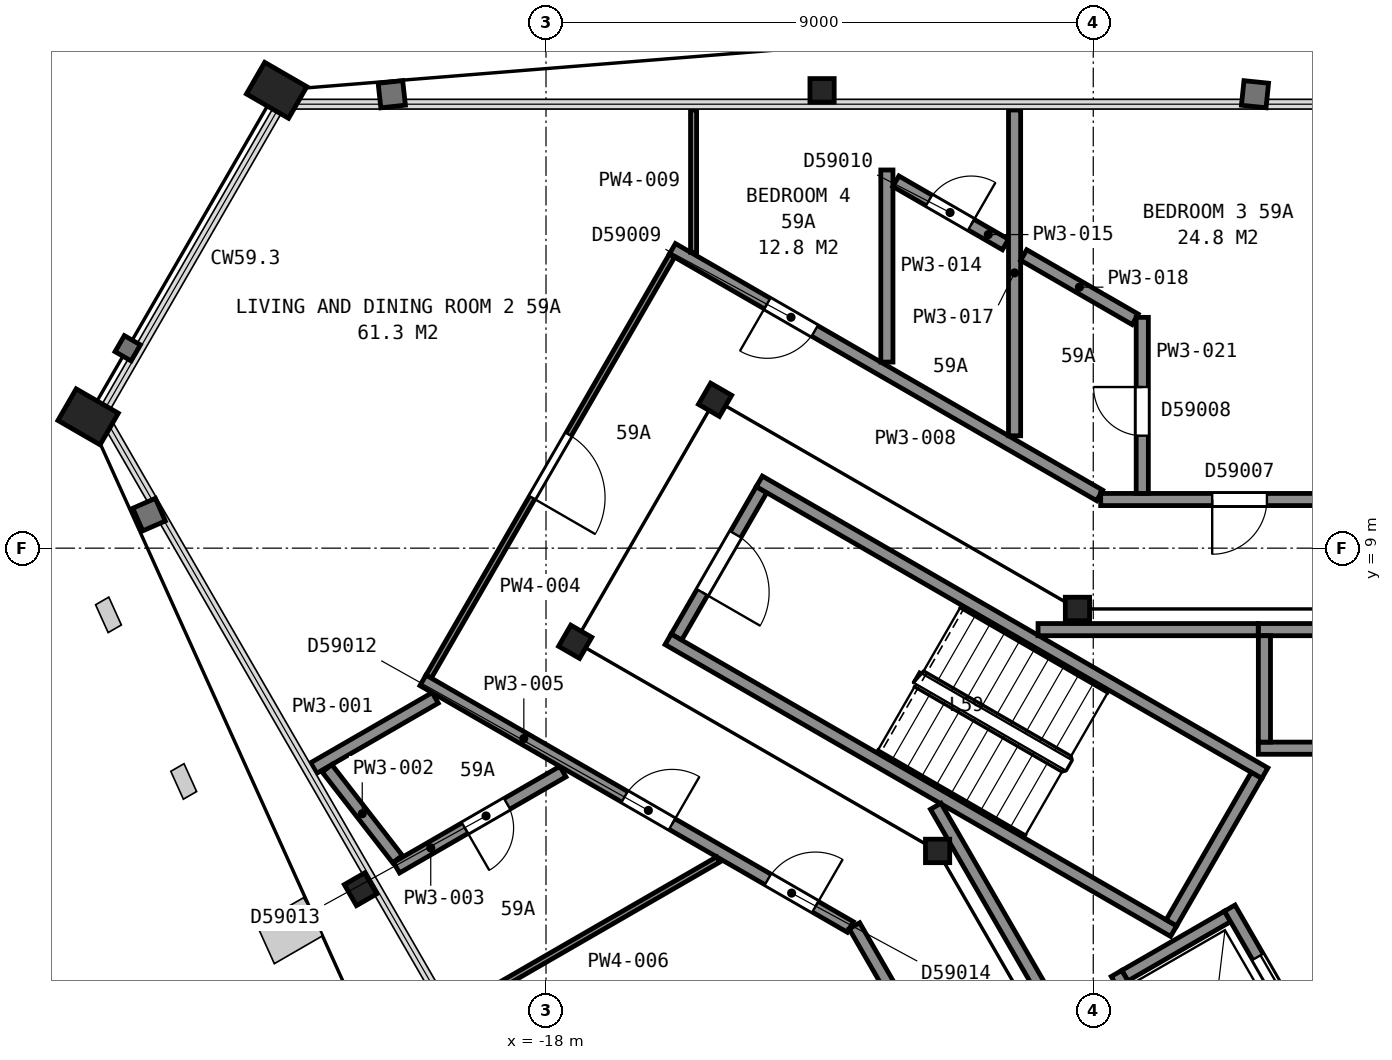
"""IFC4 building model, lengths in metres.
Left out: names, types, materials, properties, quantities, classifications, styles, units other than length and angle.
Written with IfcOpenShell. Run it as: python <this file> out.ifc"""

import sys

from ifc_helpers import new_model, si_unit, direction, frame, frame_2d, origin, origin_2d, place, context, subcontext, project, spatial, rectangle, hollow_rectangle, i_section, extrude, element, fill, save


model = new_model("IFC4")
c1 = context("Model", 3, precision=1e-05, world=origin(), true_north=direction((0.0, 1.0)))
c2 = subcontext(c1, "Body", "Model", "MODEL_VIEW")
j1 = project(units=[si_unit("LENGTHUNIT", "METRE"), si_unit("PLANEANGLEUNIT", "RADIAN")], contexts=[c1])
p1 = place(None, origin())
s1 = spatial("IfcSite", under=j1, at=p1, CompositionType="ELEMENT")
p2 = place(p1, origin())
s2 = spatial("IfcBuilding", under=s1, at=p2, CompositionType="ELEMENT")
p3 = place(p2, frame((0.0, 0.0, 236.0)))
s3 = spatial("IfcBuildingStorey", under=s2, at=p3, CompositionType="ELEMENT", Elevation=236.0)
p4 = place(p3, frame((-13.46, 16.53, 0.035), z_axis=(0.0, 0.0, 1.0), x_axis=(1.0, 0.0, 0.0)))
e1 = element("IfcColumn", 1, at=p4, inside=s3, PredefinedType="COLUMN", context=c2, shape_type="SweptSolid", body=[
    extrude(i_section(OverallWidth=0.399, OverallDepth=0.386, WebThickness=0.021, FlangeThickness=0.033, FilletRadius=0.015, at=origin_2d()), origin(), (0.0, 0.0, 1.0), 3.665),
])
for number, where, z_axis, x_axis in (
    (2, (-22.43, 16.53, 0.065), (0.0, 0.0, 1.0), (0.5, 0.866, 0.0)),
    (3, (-25.53, 11.16, 0.065), (0.0, 0.0, 1.0), (0.5, 0.866, 0.0)),
):
    element("IfcColumn", number, at=place(p3, frame(where, z_axis=z_axis, x_axis=x_axis)), inside=s3, PredefinedType="COLUMN", context=c2, shape_type="SweptSolid", body=[
        extrude(hollow_rectangle(XDim=0.6, YDim=0.8, WallThickness=0.05, at=origin_2d()), origin(), (0.0, 0.0, 1.0), 3.635),
    ])
p5 = place(p3, frame((-21.05, 3.39, 0.04), z_axis=(0.0, 0.0, 1.0), x_axis=(-0.5, 0.866025403784, 0.0)))
e4 = element("IfcColumn", 4, at=p5, inside=s3, PredefinedType="COLUMN", context=c2, shape_type="SweptSolid", body=[
    extrude(i_section(OverallWidth=0.399, OverallDepth=0.386, WebThickness=0.021, FlangeThickness=0.033, FilletRadius=0.015, at=origin_2d()), origin(), (0.0, 0.0, 1.0), 3.66),
])
p6 = place(p3, frame((-9.26, 8.0, 0.0), z_axis=(0.0, 0.0, 1.0), x_axis=(1.0, 0.0, 0.0)))
e5 = element("IfcColumn", 5, at=p6, inside=s3, PredefinedType="COLUMN", context=c2, shape_type="SweptSolid", body=[
    extrude(i_section(OverallWidth=0.399, OverallDepth=0.386, WebThickness=0.021, FlangeThickness=0.033, FilletRadius=0.015, at=origin_2d()), origin(), (0.0, 0.0, 1.0), 3.7),
])
for number, where, z_axis, x_axis in (
    (6, (-15.22, 11.44, 0.0), (0.0, 0.0, 1.0), (0.5, 0.866, 0.0)),
    (7, (-17.52, 7.46, 0.0), (0.0, 0.0, 1.0), (0.5, 0.866, 0.0)),
):
    element("IfcColumn", number, at=place(p3, frame(where, z_axis=z_axis, x_axis=x_axis)), inside=s3, PredefinedType="COLUMN", context=c2, shape_type="SweptSolid", body=[
        extrude(i_section(OverallWidth=0.401, OverallDepth=0.399, WebThickness=0.025, FlangeThickness=0.04, FilletRadius=0.015, at=origin_2d()), origin(), (0.0, 0.0, 1.0), 3.7),
    ])
p7 = place(p3, frame((-11.56, 4.02, 0.0), z_axis=(0.0, 0.0, 1.0), x_axis=(1.0, 0.0, 0.0)))
e8 = element("IfcColumn", 8, at=p7, inside=s3, PredefinedType="COLUMN", context=c2, shape_type="SweptSolid", body=[
    extrude(i_section(OverallWidth=0.399, OverallDepth=0.386, WebThickness=0.021, FlangeThickness=0.033, FilletRadius=0.015, at=origin_2d()), origin(), (0.0, 0.0, 1.0), 3.7),
])
p8 = place(p3, frame((-14.455, 9.962, 0.0), z_axis=(0.0, 0.0, 1.0), x_axis=(-0.500049511043, -0.865996816683, 0.0)))
e9 = element("IfcWall", 9, at=p8, inside=s3, PredefinedType="PARTITIONING", context=c2, shape_type="SweptSolid", body=[
    extrude(rectangle(XDim=2.8, YDim=0.2, at=frame_2d((1.4, 0.0))), origin(), (0.0, 0.0, 1.0), 3.45),
])
p9 = place(p8, frame((0.85, 0.0, 0.0)))
e10 = element("IfcOpeningElement", 10, at=p9, cuts=e9, PredefinedType="OPENING", context=c2, shape_type="SweptSolid", body=[
    extrude(rectangle(XDim=1.1, YDim=2.1, at=frame_2d((0.55, 1.05))), frame((0.0, 0.11, 0.0), z_axis=(0.0, -1.0, 0.0), x_axis=(1.0, 0.0, 0.0)), (0.0, 0.0, 1.0), 0.22),
])
for number, where, z_axis, x_axis in (
    (11, (-7.678, 2.701, 0.0), (0.0, 0.0, 1.0), (-0.866, 0.5, 0.0)),
    (12, (-6.178, 5.299, 0.0), (0.0, 0.0, 1.0), (-0.866, 0.5, 0.0)),
):
    element("IfcWall", number, at=place(p3, frame(where, z_axis=z_axis, x_axis=x_axis)), inside=s3, PredefinedType="PARTITIONING", context=c2, shape_type="SweptSolid", body=[
        extrude(rectangle(XDim=9.6, YDim=0.2, at=frame_2d((4.8, 0.0))), origin(), (0.0, 0.0, 1.0), 3.45),
    ])
p10 = place(p3, frame((-6.315, 5.262, 0.0), z_axis=(0.0, 0.0, 1.0), x_axis=(-0.500049511043, -0.865996816683, 0.0)))
e13 = element("IfcWall", 13, at=p10, inside=s3, PredefinedType="PARTITIONING", context=c2, shape_type="SweptSolid", body=[
    extrude(rectangle(XDim=2.8, YDim=0.2, at=frame_2d((1.4, 0.0))), origin(), (0.0, 0.0, 1.0), 3.45),
])
for number, where, z_axis, x_axis in (
    (14, (-6.285, 5.71, 0.0), (0.0, 0.0, 1.0), (1.0, 0.0, 0.0)),
    (15, (-6.285, 7.66, 0.0), (0.0, 0.0, 1.0), (1.0, 0.0, 0.0)),
):
    element("IfcWall", number, at=place(p3, frame(where, z_axis=z_axis, x_axis=x_axis)), inside=s3, PredefinedType="PARTITIONING", context=c2, shape_type="SweptSolid", body=[
        extrude(rectangle(XDim=2.35, YDim=0.2, at=frame_2d((1.175, 0.0))), origin(), (0.0, 0.0, 1.0), 3.7),
    ])
p11 = place(p3, frame((-8.48, 1.969, 0.0), z_axis=(0.0, 0.0, 1.0), x_axis=(0.866000020948, 0.500043961785, 0.0)))
e16 = element("IfcWall", 16, at=p11, inside=s3, PredefinedType="PARTITIONING", context=c2, shape_type="SweptSolid", body=[
    extrude(rectangle(XDim=1.95, YDim=0.2, at=frame_2d((0.975, 0.0))), origin(), (0.0, 0.0, 1.0), 3.7),
])
p12 = place(p3, frame((-6.185, 5.81, 0.0), z_axis=(0.0, 0.0, 1.0), x_axis=(0.0, 1.0, 0.0)))
e17 = element("IfcWall", 17, at=p12, inside=s3, PredefinedType="PARTITIONING", context=c2, shape_type="SweptSolid", body=[
    extrude(rectangle(XDim=1.75, YDim=0.2, at=frame_2d((0.875, 0.0))), origin(), (0.0, 0.0, 1.0), 3.7),
])
p13 = place(p3, frame((-5.28, 0.525, 0.0), z_axis=(0.0, 0.0, 1.0), x_axis=(-0.500037662692, 0.866003658127, 0.0)))
e18 = element("IfcWall", 18, at=p13, inside=s3, PredefinedType="PARTITIONING", context=c2, shape_type="SweptSolid", body=[
    extrude(rectangle(XDim=2.95, YDim=0.2, at=frame_2d((1.475, 0.0))), origin(), (0.0, 0.0, 1.0), 3.7),
])
p14 = place(p13, frame((0.925, 0.0, 0.0)))
e19 = element("IfcOpeningElement", 19, at=p14, cuts=e18, PredefinedType="OPENING", context=c2, shape_type="SweptSolid", body=[
    extrude(rectangle(XDim=1.1, YDim=2.1, at=frame_2d((0.55, 1.05))), frame((0.0, 0.11, 0.0), z_axis=(0.0, -1.0, 0.0), x_axis=(1.0, 0.0, 0.0)), (0.0, 0.0, 1.0), 0.22),
])
p15 = place(p3, frame((-7.242, -0.376, 0.0), z_axis=(0.0, 0.0, 1.0), x_axis=(-0.499996545922, 0.866027397988, 0.0)))
e20 = element("IfcWall", 20, at=p15, inside=s3, PredefinedType="PARTITIONING", context=c2, shape_type="SweptSolid", body=[
    extrude(rectangle(XDim=2.75, YDim=0.2, at=frame_2d((1.375, 0.0))), origin(), (0.0, 0.0, 1.0), 3.7),
])
p16 = place(p3, frame((-11.591, 4.755, 0.0), z_axis=(0.0, 0.0, 1.0), x_axis=(0.500043977787, -0.866000011708, 0.0)))
e21 = element("IfcWall", 21, at=p16, inside=s3, PredefinedType="PARTITIONING", context=c2, shape_type="SweptSolid", body=[
    extrude(rectangle(XDim=6.617, YDim=0.2, at=frame_2d((3.308, 0.0))), origin(), (0.0, 0.0, 1.0), 3.45),
])
p17 = place(p16, frame((3.695, 0.0, 0.0)))
e22 = element("IfcOpeningElement", 22, at=p17, cuts=e21, PredefinedType="OPENING", context=c2, shape_type="SweptSolid", body=[
    extrude(rectangle(XDim=1.8, YDim=2.1, at=frame_2d((0.9, 1.05))), frame((0.0, 0.11, 0.0), z_axis=(0.0, -1.0, 0.0), x_axis=(1.0, 0.0, 0.0)), (0.0, 0.0, 1.0), 0.22),
])
p18 = place(p3, frame((-9.908, 7.66, 0.0), z_axis=(0.0, 0.0, 1.0), x_axis=(1.0, 0.0, 0.0)))
e23 = element("IfcWall", 23, at=p18, inside=s3, PredefinedType="PARTITIONING", context=c2, shape_type="SweptSolid", body=[
    extrude(rectangle(XDim=3.621, YDim=0.2, at=frame_2d((1.811, 0.0))), origin(), (0.0, 0.0, 1.0), 3.45),
])
p19 = place(p3, frame((-21.821, 5.384, 0.0), z_axis=(0.0, 0.0, 1.0), x_axis=(0.866178541367, 0.499734664072, 0.0)))
e24 = element("IfcWall", 24, at=p19, inside=s3, PredefinedType="PARTITIONING", context=c2, shape_type="SweptSolid", body=[
    extrude(rectangle(XDim=2.308, YDim=0.2, at=frame_2d((1.154, 0.0))), origin(), (0.0, 0.0, 1.0), 2.713),
])
p20 = place(p3, frame((-21.602, 5.378, 0.0), z_axis=(0.0, 0.0, 1.0), x_axis=(0.613269592497, -0.789873665163, 0.0)))
e25 = element("IfcWall", 25, at=p20, inside=s3, PredefinedType="PARTITIONING", context=c2, shape_type="SweptSolid", body=[
    extrude(rectangle(XDim=1.89, YDim=0.2, at=frame_2d((0.945, 0.0))), origin(), (0.0, 0.0, 1.0), 2.713),
])
p21 = place(p3, frame((-20.458, 3.745, 0.0), z_axis=(0.0, 0.0, 1.0), x_axis=(0.865942402911, 0.500143734182, 0.0)))
e26 = element("IfcWall", 26, at=p21, inside=s3, PredefinedType="PARTITIONING", context=c2, shape_type="SweptSolid", body=[
    extrude(rectangle(XDim=3.16, YDim=0.2, at=frame_2d((1.58, 0.0))), origin(), (0.0, 0.0, 1.0), 2.713),
])
p22 = place(p21, frame((1.3, 0.0, 0.0)))
e27 = element("IfcOpeningElement", 27, at=p22, cuts=e26, PredefinedType="OPENING", context=c2, shape_type="SweptSolid", body=[
    extrude(rectangle(XDim=0.8, YDim=2.1, at=frame_2d((0.4, 1.05))), frame((0.0, 0.11, 0.0), z_axis=(0.0, -1.0, 0.0), x_axis=(1.0, 0.0, 0.0)), (0.0, 0.0, 1.0), 0.22),
])
p23 = place(p3, frame((-19.93, 6.888, 0.0), z_axis=(0.0, 0.0, 1.0), x_axis=(0.500420003794, 0.865782778648, 0.0)))
e28 = element("IfcWall", 28, at=p23, inside=s3, PredefinedType="PARTITIONING", context=c2, shape_type="SweptSolid", body=[
    extrude(rectangle(XDim=7.997, YDim=0.1, at=frame_2d((3.999, 0.0))), origin(), (0.0, 0.0, 1.0), 2.713),
])
p24 = place(p23, frame((3.4, 0.0, 0.0)))
e29 = element("IfcOpeningElement", 29, at=p24, cuts=e28, PredefinedType="OPENING", context=c2, shape_type="SweptSolid", body=[
    extrude(rectangle(XDim=1.2, YDim=2.1, at=frame_2d((0.6, 1.05))), frame((0.0, 0.06, 0.0), z_axis=(0.0, -1.0, 0.0), x_axis=(1.0, 0.0, 0.0)), (0.0, 0.0, 1.0), 0.12),
])
p25 = place(p3, frame((-12.995, 2.77, 0.0), z_axis=(0.0, 0.0, 1.0), x_axis=(-0.866100425926, 0.499870035319, 0.0)))
e30 = element("IfcWall", 30, at=p25, inside=s3, PredefinedType="PARTITIONING", context=c2, shape_type="SweptSolid", body=[
    extrude(rectangle(XDim=8.115, YDim=0.2, at=frame_2d((4.058, 0.0))), origin(), (0.0, 0.0, 1.0), 2.713),
])
p26 = place(p25, frame((3.385, 0.0, 0.0)))
e31 = element("IfcOpeningElement", 31, at=p26, cuts=e30, PredefinedType="OPENING", context=c2, shape_type="SweptSolid", body=[
    extrude(rectangle(XDim=0.9, YDim=2.1, at=frame_2d((0.45, 1.05))), frame((0.0, 0.11, 0.0), z_axis=(0.0, -1.0, 0.0), x_axis=(1.0, 0.0, 0.0)), (0.0, 0.0, 1.0), 0.22),
])
p27 = place(p25, frame((0.665, 0.0, 0.0)))
e32 = element("IfcOpeningElement", 32, at=p27, cuts=e30, PredefinedType="OPENING", context=c2, shape_type="SweptSolid", body=[
    extrude(rectangle(XDim=0.9, YDim=2.1, at=frame_2d((0.45, 1.05))), frame((0.0, 0.11, 0.0), z_axis=(0.0, -1.0, 0.0), x_axis=(1.0, 0.0, 0.0)), (0.0, 0.0, 1.0), 0.22),
])
p28 = place(p3, frame((-19.507, 1.375, 0.0), z_axis=(0.0, 0.0, 1.0), x_axis=(0.86604843891, 0.499960099869, 0.0)))
e33 = element("IfcWall", 33, at=p28, inside=s3, PredefinedType="PARTITIONING", context=c2, shape_type="SweptSolid", body=[
    extrude(rectangle(XDim=5.01, YDim=0.1, at=frame_2d((2.505, 0.0))), origin(), (0.0, 0.0, 1.0), 2.713),
])
p29 = place(p3, frame((-15.921, 13.923, 0.0), z_axis=(0.0, 0.0, 1.0), x_axis=(0.866079355551, -0.499906541154, 0.0)))
e34 = element("IfcWall", 34, at=p29, inside=s3, PredefinedType="PARTITIONING", context=c2, shape_type="SweptSolid", body=[
    extrude(rectangle(XDim=8.113, YDim=0.2, at=frame_2d((4.056, 0.0))), origin(), (0.0, 0.0, 1.0), 2.713),
])
p30 = place(p29, frame((1.802, 0.0, 0.0)))
e35 = element("IfcOpeningElement", 35, at=p30, cuts=e34, PredefinedType="OPENING", context=c2, shape_type="SweptSolid", body=[
    extrude(rectangle(XDim=0.9, YDim=2.1, at=frame_2d((0.45, 1.05))), frame((0.0, 0.11, 0.0), z_axis=(0.0, -1.0, 0.0), x_axis=(1.0, 0.0, 0.0)), (0.0, 0.0, 1.0), 0.22),
])
p31 = place(p3, frame((-15.573, 13.866, 0.0), z_axis=(0.0, 0.0, 1.0), x_axis=(0.0, 1.0, 0.0)))
e36 = element("IfcWall", 36, at=p31, inside=s3, PredefinedType="PARTITIONING", context=c2, shape_type="SweptSolid", body=[
    extrude(rectangle(XDim=2.34, YDim=0.1, at=frame_2d((1.17, 0.0))), origin(), (0.0, 0.0, 1.0), 2.713),
])
p32 = place(p3, frame((-4.077, -12.543, 0.0), z_axis=(0.0, 0.0, 1.0), x_axis=(-0.499968768298, 0.866043434665, 0.0)))
e37 = element("IfcWall", 37, at=p32, inside=s3, PredefinedType="PARTITIONING", context=c2, shape_type="SweptSolid", body=[
    extrude(rectangle(XDim=17.703, YDim=0.2, at=frame_2d((8.852, 0.0))), origin(), (0.0, 0.0, 1.0), 2.713),
])
p33 = place(p32, frame((11.052, 0.0, 0.0)))
e38 = element("IfcOpeningElement", 38, at=p33, cuts=e37, PredefinedType="OPENING", context=c2, shape_type="SweptSolid", body=[
    extrude(rectangle(XDim=0.9, YDim=2.1, at=frame_2d((0.45, 1.05))), frame((0.0, 0.11, 0.0), z_axis=(0.0, -1.0, 0.0), x_axis=(1.0, 0.0, 0.0)), (0.0, 0.0, 1.0), 0.22),
])
p34 = place(p32, frame((7.098, 0.0, 0.0)))
e39 = element("IfcOpeningElement", 39, at=p34, cuts=e37, PredefinedType="OPENING", context=c2, shape_type="SweptSolid", body=[
    extrude(rectangle(XDim=0.9, YDim=2.1, at=frame_2d((0.45, 1.05))), frame((0.0, 0.11, 0.0), z_axis=(0.0, -1.0, 0.0), x_axis=(1.0, 0.0, 0.0)), (0.0, 0.0, 1.0), 0.22),
])
p35 = place(p32, frame((2.099, 0.0, 0.0)))
e40 = element("IfcOpeningElement", 40, at=p35, cuts=e37, PredefinedType="OPENING", context=c2, shape_type="SweptSolid", body=[
    extrude(rectangle(XDim=0.9, YDim=2.1, at=frame_2d((0.45, 1.05))), frame((0.0, 0.11, 0.0), z_axis=(0.0, -1.0, 0.0), x_axis=(1.0, 0.0, 0.0)), (0.0, 0.0, 1.0), 0.22),
])
p36 = place(p3, frame((-12.394, 12.06, 0.0), z_axis=(0.0, 0.0, 1.0), x_axis=(0.0, 1.0, 0.0)))
e41 = element("IfcWall", 41, at=p36, inside=s3, PredefinedType="PARTITIONING", context=c2, shape_type="SweptSolid", body=[
    extrude(rectangle(XDim=3.16, YDim=0.2, at=frame_2d((1.58, 0.0))), origin(), (0.0, 0.0, 1.0), 2.713),
])
p37 = place(p3, frame((-10.444, 13.995, 0.0), z_axis=(0.0, 0.0, 1.0), x_axis=(-0.866134808485, 0.499810457605, 0.0)))
e42 = element("IfcWall", 42, at=p37, inside=s3, PredefinedType="PARTITIONING", context=c2, shape_type="SweptSolid", body=[
    extrude(rectangle(XDim=2.081, YDim=0.2, at=frame_2d((1.041, 0.0))), origin(), (0.0, 0.0, 1.0), 2.713),
])
p38 = place(p37, frame((0.651, 0.0, 0.0)))
e43 = element("IfcOpeningElement", 43, at=p38, cuts=e42, PredefinedType="OPENING", context=c2, shape_type="SweptSolid", body=[
    extrude(rectangle(XDim=0.8, YDim=2.1, at=frame_2d((0.4, 1.05))), frame((0.0, 0.11, 0.0), z_axis=(0.0, -1.0, 0.0), x_axis=(1.0, 0.0, 0.0)), (0.0, 0.0, 1.0), 0.22),
])
p39 = place(p3, frame((-10.294, 10.848, 0.0), z_axis=(0.0, 0.0, 1.0), x_axis=(0.0, 1.0, 0.0)))
e44 = element("IfcWall", 44, at=p39, inside=s3, PredefinedType="PARTITIONING", context=c2, shape_type="SweptSolid", body=[
    extrude(rectangle(XDim=5.358, YDim=0.2, at=frame_2d((2.679, 0.0))), origin(), (0.0, 0.0, 1.0), 2.713),
])
p40 = place(p3, frame((-10.144, 13.822, 0.0), z_axis=(0.0, 0.0, 1.0), x_axis=(0.866062654302, -0.49993547466, 0.0)))
e45 = element("IfcWall", 45, at=p40, inside=s3, PredefinedType="PARTITIONING", context=c2, shape_type="SweptSolid", body=[
    extrude(rectangle(XDim=2.116, YDim=0.2, at=frame_2d((1.058, 0.0))), origin(), (0.0, 0.0, 1.0), 2.713),
])
p41 = place(p3, frame((-8.878, 9.8, 0.0), z_axis=(0.0, 0.0, 1.0), x_axis=(1.0, 0.0, 0.0)))
e46 = element("IfcWall", 46, at=p41, inside=s3, PredefinedType="PARTITIONING", context=c2, shape_type="SweptSolid", body=[
    extrude(rectangle(XDim=17.756, YDim=0.2, at=frame_2d((8.878, 0.0))), origin(), (0.0, 0.0, 1.0), 2.713),
])
p42 = place(p41, frame((12.792, 0.0, 0.0)))
e47 = element("IfcOpeningElement", 47, at=p42, cuts=e46, PredefinedType="OPENING", context=c2, shape_type="SweptSolid", body=[
    extrude(rectangle(XDim=1.2, YDim=2.1, at=frame_2d((0.6, 1.05))), frame((0.0, 0.11, 0.0), z_axis=(0.0, -1.0, 0.0), x_axis=(1.0, 0.0, 0.0)), (0.0, 0.0, 1.0), 0.22),
])
p43 = place(p41, frame((5.013, 0.0, 0.0)))
e48 = element("IfcOpeningElement", 48, at=p43, cuts=e46, PredefinedType="OPENING", context=c2, shape_type="SweptSolid", body=[
    extrude(rectangle(XDim=0.9, YDim=2.1, at=frame_2d((0.45, 1.05))), frame((0.0, 0.11, 0.0), z_axis=(0.0, -1.0, 0.0), x_axis=(1.0, 0.0, 0.0)), (0.0, 0.0, 1.0), 0.22),
])
p44 = place(p41, frame((1.834, 0.0, 0.0)))
e49 = element("IfcOpeningElement", 49, at=p44, cuts=e46, PredefinedType="OPENING", context=c2, shape_type="SweptSolid", body=[
    extrude(rectangle(XDim=0.9, YDim=2.1, at=frame_2d((0.45, 1.05))), frame((0.0, 0.11, 0.0), z_axis=(0.0, -1.0, 0.0), x_axis=(1.0, 0.0, 0.0)), (0.0, 0.0, 1.0), 0.22),
])
p45 = place(p3, frame((-8.194, 9.9, 0.0), z_axis=(0.0, 0.0, 1.0), x_axis=(0.0, 1.0, 0.0)))
e50 = element("IfcWall", 50, at=p45, inside=s3, PredefinedType="PARTITIONING", context=c2, shape_type="SweptSolid", body=[
    extrude(rectangle(XDim=2.896, YDim=0.2, at=frame_2d((1.448, 0.0))), origin(), (0.0, 0.0, 1.0), 2.713),
])
p46 = place(p45, frame((0.95, 0.0, 0.0)))
e51 = element("IfcOpeningElement", 51, at=p46, cuts=e50, PredefinedType="OPENING", context=c2, shape_type="SweptSolid", body=[
    extrude(rectangle(XDim=0.8, YDim=2.1, at=frame_2d((0.4, 1.05))), frame((0.0, 0.11, 0.0), z_axis=(0.0, -1.0, 0.0), x_axis=(1.0, 0.0, 0.0)), (0.0, 0.0, 1.0), 0.22),
])
p47 = place(p9, origin())
e52 = element("IfcDoor", 52, at=p47, inside=s3, OperationType="SINGLE_SWING_RIGHT", PredefinedType="DOOR", context=c2, shape_type="SweptSolid", body=[
    extrude(rectangle(XDim=1.1, YDim=2.1, at=frame_2d((0.55, 1.05))), frame((0.0, 0.025, 0.0), z_axis=(0.0, -1.0, 0.0), x_axis=(1.0, 0.0, 0.0)), (0.0, 0.0, 1.0), 0.05),
])
fill(e10, e52)
p48 = place(p14, origin())
e53 = element("IfcDoor", 53, at=p48, inside=s3, OperationType="SLIDING_TO_LEFT", PredefinedType="DOOR", context=c2, shape_type="SweptSolid", body=[
    extrude(rectangle(XDim=1.1, YDim=2.1, at=frame_2d((0.55, 1.05))), frame((0.0, 0.025, 0.0), z_axis=(0.0, -1.0, 0.0), x_axis=(1.0, 0.0, 0.0)), (0.0, 0.0, 1.0), 0.05),
])
fill(e19, e53)
p49 = place(p22, origin())
e54 = element("IfcDoor", 54, at=p49, inside=s3, OperationType="SINGLE_SWING_LEFT", PredefinedType="DOOR", context=c2, shape_type="SweptSolid", body=[
    extrude(rectangle(XDim=0.8, YDim=2.1, at=frame_2d((0.4, 1.05))), frame((0.0, 0.025, 0.0), z_axis=(0.0, -1.0, 0.0), x_axis=(1.0, 0.0, 0.0)), (0.0, 0.0, 1.0), 0.05),
])
fill(e27, e54)
p50 = place(p24, origin())
e55 = element("IfcDoor", 55, at=p50, inside=s3, OperationType="SINGLE_SWING_LEFT", PredefinedType="DOOR", context=c2, shape_type="SweptSolid", body=[
    extrude(rectangle(XDim=1.2, YDim=2.1, at=frame_2d((0.6, 1.05))), frame((0.0, 0.025, 0.0), z_axis=(0.0, -1.0, 0.0), x_axis=(1.0, 0.0, 0.0)), (0.0, 0.0, 1.0), 0.05),
])
fill(e29, e55)
p51 = place(p26, origin())
e56 = element("IfcDoor", 56, at=p51, inside=s3, OperationType="SINGLE_SWING_LEFT", PredefinedType="DOOR", context=c2, shape_type="SweptSolid", body=[
    extrude(rectangle(XDim=0.9, YDim=2.1, at=frame_2d((0.45, 1.05))), frame((0.0, 0.025, 0.0), z_axis=(0.0, -1.0, 0.0), x_axis=(1.0, 0.0, 0.0)), (0.0, 0.0, 1.0), 0.05),
])
fill(e31, e56)
p52 = place(p27, origin())
e57 = element("IfcDoor", 57, at=p52, inside=s3, OperationType="SINGLE_SWING_LEFT", PredefinedType="DOOR", context=c2, shape_type="SweptSolid", body=[
    extrude(rectangle(XDim=0.9, YDim=2.1, at=frame_2d((0.45, 1.05))), frame((0.0, 0.025, 0.0), z_axis=(0.0, -1.0, 0.0), x_axis=(1.0, 0.0, 0.0)), (0.0, 0.0, 1.0), 0.05),
])
fill(e32, e57)
p53 = place(p30, origin())
e58 = element("IfcDoor", 58, at=p53, inside=s3, OperationType="SINGLE_SWING_LEFT", PredefinedType="DOOR", context=c2, shape_type="SweptSolid", body=[
    extrude(rectangle(XDim=0.9, YDim=2.1, at=frame_2d((0.45, 1.05))), frame((0.0, 0.025, 0.0), z_axis=(0.0, -1.0, 0.0), x_axis=(1.0, 0.0, 0.0)), (0.0, 0.0, 1.0), 0.05),
])
fill(e35, e58)
p54 = place(p38, origin())
e59 = element("IfcDoor", 59, at=p54, inside=s3, OperationType="SINGLE_SWING_LEFT", PredefinedType="DOOR", context=c2, shape_type="SweptSolid", body=[
    extrude(rectangle(XDim=0.8, YDim=2.1, at=frame_2d((0.4, 1.05))), frame((0.0, 0.025, 0.0), z_axis=(0.0, -1.0, 0.0), x_axis=(1.0, 0.0, 0.0)), (0.0, 0.0, 1.0), 0.05),
])
fill(e43, e59)
p55 = place(p44, origin())
e60 = element("IfcDoor", 60, at=p55, inside=s3, OperationType="SINGLE_SWING_LEFT", PredefinedType="DOOR", context=c2, shape_type="SweptSolid", body=[
    extrude(rectangle(XDim=0.9, YDim=2.1, at=frame_2d((0.45, 1.05))), frame((0.0, 0.025, 0.0), z_axis=(0.0, -1.0, 0.0), x_axis=(1.0, 0.0, 0.0)), (0.0, 0.0, 1.0), 0.05),
])
fill(e49, e60)
p56 = place(p46, origin())
e61 = element("IfcDoor", 61, at=p56, inside=s3, OperationType="SINGLE_SWING_RIGHT", PredefinedType="DOOR", context=c2, shape_type="SweptSolid", body=[
    extrude(rectangle(XDim=0.8, YDim=2.1, at=frame_2d((0.4, 1.05))), frame((0.0, 0.025, 0.0), z_axis=(0.0, -1.0, 0.0), x_axis=(1.0, 0.0, 0.0)), (0.0, 0.0, 1.0), 0.05),
])
fill(e51, e61)
save(model, sys.argv[1])
